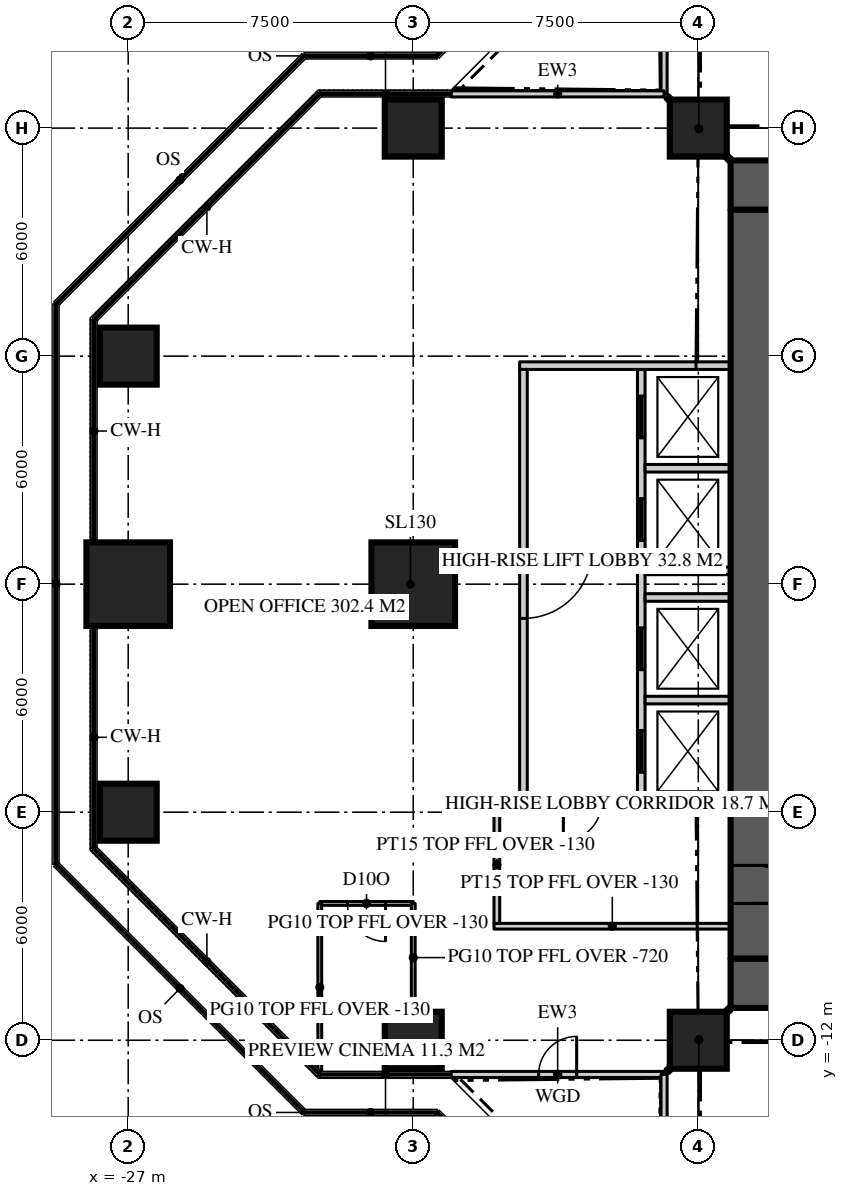
"""IFC4 building model, lengths in metres.
Left out: names, types, materials, properties, quantities, classifications, styles, units other than length and angle.
Written with IfcOpenShell. Run it as: python <this file> out.ifc"""

import sys

from ifc_helpers import new_model, si_unit, direction, frame, frame_2d, origin, origin_2d, place, context, subcontext, project, spatial, rectangle, extrude, element, fill, save


model = new_model("IFC4")
c1 = context("Model", 3, precision=1e-05, world=origin(), true_north=direction((0.0, 1.0)))
c2 = subcontext(c1, "Body", "Model", "MODEL_VIEW")
j1 = project(units=[si_unit("LENGTHUNIT", "METRE"), si_unit("PLANEANGLEUNIT", "RADIAN")], contexts=[c1])
p1 = place(None, origin())
s1 = spatial("IfcSite", under=j1, at=p1, CompositionType="ELEMENT")
p2 = place(p1, origin())
s2 = spatial("IfcBuilding", under=s1, at=p2, CompositionType="ELEMENT")
p3 = place(p2, frame((0.0, 0.0, 255.6)))
s3 = spatial("IfcBuildingStorey", under=s2, at=p3, CompositionType="ELEMENT", Elevation=255.6)
p4 = place(p3, frame((-11.15, 10.5, 0.0), z_axis=(0.0, 0.0, 1.0), x_axis=(1.0, 0.0, 0.0)))
e1 = element("IfcWall", 1, at=p4, inside=s3, PredefinedType="SHEAR", context=c2, shape_type="SweptSolid", body=[
    extrude(rectangle(XDim=22.3, YDim=1.3, at=frame_2d((11.15, 0.0))), origin(), (0.0, 0.0, 1.0), 3.9),
])
p5 = place(p4, frame((4.25, 0.0, 0.0)))
e2 = element("IfcOpeningElement", 2, at=p5, cuts=e1, PredefinedType="OPENING", context=c2, shape_type="SweptSolid", body=[
    extrude(rectangle(XDim=1.8, YDim=2.2, at=frame_2d((0.9, 1.1))), frame((0.0, 0.66, 0.0), z_axis=(0.0, -1.0, 0.0), x_axis=(1.0, 0.0, 0.0)), (0.0, 0.0, 1.0), 1.32),
])
p6 = place(p4, frame((16.25, 0.0, 0.0)))
e3 = element("IfcOpeningElement", 3, at=p6, cuts=e1, PredefinedType="OPENING", context=c2, shape_type="SweptSolid", body=[
    extrude(rectangle(XDim=1.8, YDim=2.2, at=frame_2d((0.9, 1.1))), frame((0.0, 0.66, 0.0), z_axis=(0.0, -1.0, 0.0), x_axis=(1.0, 0.0, 0.0)), (0.0, 0.0, 1.0), 1.32),
])
p7 = place(p3, frame((11.15, -10.5, 0.0), z_axis=(0.0, 0.0, 1.0), x_axis=(-1.0, 0.0, 0.0)))
e4 = element("IfcWall", 4, at=p7, inside=s3, PredefinedType="SHEAR", context=c2, shape_type="SweptSolid", body=[
    extrude(rectangle(XDim=22.3, YDim=1.3, at=frame_2d((11.15, 0.0))), origin(), (0.0, 0.0, 1.0), 3.9),
])
p8 = place(p7, frame((16.25, 0.0, 0.0)))
e5 = element("IfcOpeningElement", 5, at=p8, cuts=e4, PredefinedType="OPENING", context=c2, shape_type="SweptSolid", body=[
    extrude(rectangle(XDim=1.8, YDim=2.2, at=frame_2d((0.9, 1.1))), frame((0.0, 0.66, 0.0), z_axis=(0.0, -1.0, 0.0), x_axis=(1.0, 0.0, 0.0)), (0.0, 0.0, 1.0), 1.32),
])
p9 = place(p7, frame((4.25, 0.0, 0.0)))
e6 = element("IfcOpeningElement", 6, at=p9, cuts=e4, PredefinedType="OPENING", context=c2, shape_type="SweptSolid", body=[
    extrude(rectangle(XDim=1.8, YDim=2.2, at=frame_2d((0.9, 1.1))), frame((0.0, 0.66, 0.0), z_axis=(0.0, -1.0, 0.0), x_axis=(1.0, 0.0, 0.0)), (0.0, 0.0, 1.0), 1.32),
])
p10 = place(p3, frame((-10.5, 9.85, 0.0), z_axis=(0.0, 0.0, 1.0), x_axis=(0.0, -1.0, 0.0)))
e7 = element("IfcWall", 7, at=p10, inside=s3, PredefinedType="SHEAR", context=c2, shape_type="SweptSolid", body=[
    extrude(rectangle(XDim=19.7, YDim=1.3, at=frame_2d((9.85, 0.0))), origin(), (0.0, 0.0, 1.0), 3.9),
])
p11 = place(p10, frame((17.25, 0.0, 0.0)))
e8 = element("IfcOpeningElement", 8, at=p11, cuts=e7, PredefinedType="OPENING", context=c2, shape_type="SweptSolid", body=[
    extrude(rectangle(XDim=1.0, YDim=2.2, at=frame_2d((0.5, 1.1))), frame((0.0, 0.66, 0.0), z_axis=(0.0, -1.0, 0.0), x_axis=(1.0, 0.0, 0.0)), (0.0, 0.0, 1.0), 1.32),
])
for number, where, z_axis, x_axis in (
    (9, (-19.5, -12.0, 0.0), (0.0, 0.0, 1.0), (1.0, 0.0, 0.0)),
    (10, (-12.0, -12.0, 0.0), (0.0, 0.0, 1.0), (1.0, 0.0, 0.0)),
    (11, (-27.0, -6.0, 0.0), (0.0, 0.0, 1.0), (1.0, 0.0, 0.0)),
):
    element("IfcColumn", number, at=place(p3, frame(where, z_axis=z_axis, x_axis=x_axis)), inside=s3, PredefinedType="COLUMN", context=c2, shape_type="SweptSolid", body=[
        extrude(rectangle(XDim=1.5, YDim=1.5, at=origin_2d()), origin(), (0.0, 0.0, 1.0), 3.9),
    ])
for number, where, z_axis, x_axis in (
    (12, (-27.0, 0.0, 0.0), (0.0, 0.0, 1.0), (1.0, 0.0, 0.0)),
    (13, (-19.5, 0.0, 0.0), (0.0, 0.0, 1.0), (1.0, 0.0, 0.0)),
):
    element("IfcColumn", number, at=place(p3, frame(where, z_axis=z_axis, x_axis=x_axis)), inside=s3, PredefinedType="COLUMN", context=c2, shape_type="SweptSolid", body=[
        extrude(rectangle(XDim=2.2, YDim=2.2, at=origin_2d()), origin(), (0.0, 0.0, 1.0), 3.9),
    ])
for number, where, z_axis, x_axis in (
    (14, (-27.0, 6.0, 0.0), (0.0, 0.0, 1.0), (1.0, 0.0, 0.0)),
    (15, (-19.5, 12.0, 0.0), (0.0, 0.0, 1.0), (1.0, 0.0, 0.0)),
    (16, (-12.0, 12.0, 0.0), (0.0, 0.0, 1.0), (1.0, 0.0, 0.0)),
):
    element("IfcColumn", number, at=place(p3, frame(where, z_axis=z_axis, x_axis=x_axis)), inside=s3, PredefinedType="COLUMN", context=c2, shape_type="SweptSolid", body=[
        extrude(rectangle(XDim=1.5, YDim=1.5, at=origin_2d()), origin(), (0.0, 0.0, 1.0), 3.9),
    ])
p12 = place(p3, frame((-12.9, 18.5, 0.0), z_axis=(0.0, 0.0, 1.0), x_axis=(0.0, -1.0, 0.0)))
e17 = element("IfcWall", 17, at=p12, inside=s3, PredefinedType="SOLIDWALL", context=c2, shape_type="SweptSolid", body=[
    extrude(rectangle(XDim=5.6, YDim=0.16, at=frame_2d((2.8, 0.0))), origin(), (0.0, 0.0, 1.0), 3.77),
])
p13 = place(p12, frame((2.3, 0.0, 0.0)))
e18 = element("IfcOpeningElement", 18, at=p13, cuts=e17, PredefinedType="OPENING", context=c2, shape_type="SweptSolid", body=[
    extrude(rectangle(XDim=1.0, YDim=2.2, at=frame_2d((0.5, 1.1))), frame((0.0, 0.09, 0.0), z_axis=(0.0, -1.0, 0.0), x_axis=(1.0, 0.0, 0.0)), (0.0, 0.0, 1.0), 0.18),
])
p14 = place(p3, frame((-12.9, 12.9, 0.0), z_axis=(0.0, 0.0, 1.0), x_axis=(-1.0, 0.0, 0.0)))
e19 = element("IfcWall", 19, at=p14, inside=s3, PredefinedType="SOLIDWALL", context=c2, shape_type="SweptSolid", body=[
    extrude(rectangle(XDim=5.6, YDim=0.16, at=frame_2d((2.8, 0.0))), origin(), (0.0, 0.0, 1.0), 3.77),
])
p15 = place(p3, frame((-18.5, -12.9, 0.0), z_axis=(0.0, 0.0, 1.0), x_axis=(1.0, 0.0, 0.0)))
e20 = element("IfcWall", 20, at=p15, inside=s3, PredefinedType="SOLIDWALL", context=c2, shape_type="SweptSolid", body=[
    extrude(rectangle(XDim=5.6, YDim=0.16, at=frame_2d((2.8, 0.0))), origin(), (0.0, 0.0, 1.0), 3.77),
])
p16 = place(p15, frame((2.3, 0.0, 0.0)))
e21 = element("IfcOpeningElement", 21, at=p16, cuts=e20, PredefinedType="OPENING", context=c2, shape_type="SweptSolid", body=[
    extrude(rectangle(XDim=1.0, YDim=2.2, at=frame_2d((0.5, 1.1))), frame((0.0, 0.09, 0.0), z_axis=(0.0, -1.0, 0.0), x_axis=(1.0, 0.0, 0.0)), (0.0, 0.0, 1.0), 0.18),
])
p17 = place(p3, frame((-12.9, -12.9, 0.0), z_axis=(0.0, 0.0, 1.0), x_axis=(0.0, -1.0, 0.0)))
e22 = element("IfcWall", 22, at=p17, inside=s3, PredefinedType="SOLIDWALL", context=c2, shape_type="SweptSolid", body=[
    extrude(rectangle(XDim=5.6, YDim=0.16, at=frame_2d((2.8, 0.0))), origin(), (0.0, 0.0, 1.0), 3.77),
])
p18 = place(p3, frame((-19.5, -8.4, 0.0), z_axis=(0.0, 0.0, 1.0), x_axis=(-1.0, 0.0, 0.0)))
e23 = element("IfcWall", 23, at=p18, inside=s3, PredefinedType="PARTITIONING", context=c2, shape_type="SweptSolid", body=[
    extrude(rectangle(XDim=2.459, YDim=0.1, at=frame_2d((1.229, 0.0))), origin(), (0.0, 0.0, 1.0), 3.77),
])
p19 = place(p18, frame((0.729, 0.0, 0.0)))
e24 = element("IfcOpeningElement", 24, at=p19, cuts=e23, PredefinedType="OPENING", context=c2, shape_type="SweptSolid", body=[
    extrude(rectangle(XDim=1.0, YDim=2.2, at=frame_2d((0.5, 1.1))), frame((0.0, 0.06, 0.0), z_axis=(0.0, -1.0, 0.0), x_axis=(1.0, 0.0, 0.0)), (0.0, 0.0, 1.0), 0.12),
])
p20 = place(p3, frame((-19.5, -8.4, 0.0), z_axis=(0.0, 0.0, 1.0), x_axis=(0.0, -1.0, 0.0)))
e25 = element("IfcWall", 25, at=p20, inside=s3, PredefinedType="PARTITIONING", context=c2, shape_type="SweptSolid", body=[
    extrude(rectangle(XDim=2.85, YDim=0.1, at=frame_2d((1.425, 0.0))), origin(), (0.0, 0.0, 1.0), 3.18),
])
p21 = place(p3, frame((-21.959, -8.4, 0.0), z_axis=(0.0, 0.0, 1.0), x_axis=(0.0, -1.0, 0.0)))
e26 = element("IfcWall", 26, at=p21, inside=s3, PredefinedType="PARTITIONING", context=c2, shape_type="SweptSolid", body=[
    extrude(rectangle(XDim=4.42, YDim=0.1, at=frame_2d((2.21, 0.0))), origin(), (0.0, 0.0, 1.0), 3.77),
])
p22 = place(p3, frame((-13.5, 5.65, 0.0), z_axis=(0.0, 0.0, 1.0), x_axis=(0.0, -1.0, 0.0)))
e27 = element("IfcWall", 27, at=p22, inside=s3, PredefinedType="SOLIDWALL", context=c2, shape_type="SweptSolid", body=[
    extrude(rectangle(XDim=11.3, YDim=0.2, at=frame_2d((5.65, 0.0))), origin(), (0.0, 0.0, 1.0), 3.7),
])
p23 = place(p22, frame((0.7, 0.0, 0.0)))
e28 = element("IfcOpeningElement", 28, at=p23, cuts=e27, PredefinedType="OPENING", context=c2, shape_type="SweptSolid", body=[
    extrude(rectangle(XDim=1.1, YDim=2.2, at=frame_2d((0.55, 1.1))), frame((0.0, 0.11, 0.0), z_axis=(0.0, -1.0, 0.0), x_axis=(1.0, 0.0, 0.0)), (0.0, 0.0, 1.0), 0.22),
])
p24 = place(p22, frame((3.4, 0.0, 0.0)))
e29 = element("IfcOpeningElement", 29, at=p24, cuts=e27, PredefinedType="OPENING", context=c2, shape_type="SweptSolid", body=[
    extrude(rectangle(XDim=1.1, YDim=2.2, at=frame_2d((0.55, 1.1))), frame((0.0, 0.11, 0.0), z_axis=(0.0, -1.0, 0.0), x_axis=(1.0, 0.0, 0.0)), (0.0, 0.0, 1.0), 0.22),
])
p25 = place(p22, frame((6.8, 0.0, 0.0)))
e30 = element("IfcOpeningElement", 30, at=p25, cuts=e27, PredefinedType="OPENING", context=c2, shape_type="SweptSolid", body=[
    extrude(rectangle(XDim=1.1, YDim=2.2, at=frame_2d((0.55, 1.1))), frame((0.0, 0.11, 0.0), z_axis=(0.0, -1.0, 0.0), x_axis=(1.0, 0.0, 0.0)), (0.0, 0.0, 1.0), 0.22),
])
p26 = place(p22, frame((9.5, 0.0, 0.0)))
e31 = element("IfcOpeningElement", 31, at=p26, cuts=e27, PredefinedType="OPENING", context=c2, shape_type="SweptSolid", body=[
    extrude(rectangle(XDim=1.1, YDim=2.2, at=frame_2d((0.55, 1.1))), frame((0.0, 0.11, 0.0), z_axis=(0.0, -1.0, 0.0), x_axis=(1.0, 0.0, 0.0)), (0.0, 0.0, 1.0), 0.22),
])
p27 = place(p3, frame((-11.15, 5.75, 0.0), z_axis=(0.0, 0.0, 1.0), x_axis=(-1.0, 0.0, 0.0)))
e32 = element("IfcWall", 32, at=p27, inside=s3, PredefinedType="SOLIDWALL", context=c2, shape_type="SweptSolid", body=[
    extrude(rectangle(XDim=5.55, YDim=0.2, at=frame_2d((2.775, 0.0))), origin(), (0.0, 0.0, 1.0), 3.7),
])
p28 = place(p3, frame((-11.15, -5.75, 0.0), z_axis=(0.0, 0.0, 1.0), x_axis=(-1.0, 0.0, 0.0)))
e33 = element("IfcWall", 33, at=p28, inside=s3, PredefinedType="SOLIDWALL", context=c2, shape_type="SweptSolid", body=[
    extrude(rectangle(XDim=5.55, YDim=0.2, at=frame_2d((2.775, 0.0))), origin(), (0.0, 0.0, 1.0), 3.7),
])
p29 = place(p28, frame((3.4, 0.0, 0.0)))
e34 = element("IfcOpeningElement", 34, at=p29, cuts=e33, PredefinedType="OPENING", context=c2, shape_type="SweptSolid", body=[
    extrude(rectangle(XDim=1.0, YDim=2.2, at=frame_2d((0.5, 1.1))), frame((0.0, 0.11, 0.0), z_axis=(0.0, -1.0, 0.0), x_axis=(1.0, 0.0, 0.0)), (0.0, 0.0, 1.0), 0.22),
])
for number, where, z_axis, x_axis in (
    (35, (-11.15, 3.05, 0.0), (0.0, 0.0, 1.0), (-1.0, 0.0, 0.0)),
    (36, (-11.15, 0.35, 0.0), (0.0, 0.0, 1.0), (-1.0, 0.0, 0.0)),
    (37, (-11.15, -0.35, 0.0), (0.0, 0.0, 1.0), (-1.0, 0.0, 0.0)),
    (38, (-11.15, -3.05, 0.0), (0.0, 0.0, 1.0), (-1.0, 0.0, 0.0)),
):
    element("IfcWall", number, at=place(p3, frame(where, z_axis=z_axis, x_axis=x_axis)), inside=s3, PredefinedType="SOLIDWALL", context=c2, shape_type="SweptSolid", body=[
        extrude(rectangle(XDim=2.25, YDim=0.2, at=frame_2d((1.125, 0.0))), origin(), (0.0, 0.0, 1.0), 3.7),
    ])
p30 = place(p3, frame((-16.6, 5.65, 0.0), z_axis=(0.0, 0.0, 1.0), x_axis=(0.0, -1.0, 0.0)))
e39 = element("IfcWall", 39, at=p30, inside=s3, PredefinedType="SOLIDWALL", context=c2, shape_type="SweptSolid", body=[
    extrude(rectangle(XDim=11.3, YDim=0.2, at=frame_2d((5.65, 0.0))), origin(), (0.0, 0.0, 1.0), 3.18),
])
p31 = place(p30, frame((4.75, 0.0, 0.0)))
e40 = element("IfcOpeningElement", 40, at=p31, cuts=e39, PredefinedType="OPENING", context=c2, shape_type="SweptSolid", body=[
    extrude(rectangle(XDim=1.8, YDim=2.2, at=frame_2d((0.9, 1.1))), frame((0.0, 0.11, 0.0), z_axis=(0.0, -1.0, 0.0), x_axis=(1.0, 0.0, 0.0)), (0.0, 0.0, 1.0), 0.22),
])
for number, where, z_axis, x_axis in (
    (41, (-11.15, 11.15, 0.0), (0.0, 0.0, 1.0), (-0.707, 0.707, 0.0)),
    (42, (-11.15, -11.15, 0.0), (0.0, 0.0, 1.0), (-0.707, -0.707, 0.0)),
):
    element("IfcWall", number, at=place(p3, frame(where, z_axis=z_axis, x_axis=x_axis)), inside=s3, PredefinedType="PARTITIONING", context=c2, shape_type="SweptSolid", body=[
        extrude(rectangle(XDim=2.362, YDim=0.15, at=frame_2d((1.181, 0.0))), origin(), (0.0, 0.0, 1.0), 3.22),
    ])
p32 = place(p3, frame((-11.15, -9.0, 0.0), z_axis=(0.0, 0.0, 1.0), x_axis=(-1.0, 0.0, 0.0)))
e43 = element("IfcWall", 43, at=p32, inside=s3, PredefinedType="PARTITIONING", context=c2, shape_type="SweptSolid", body=[
    extrude(rectangle(XDim=6.225, YDim=0.15, at=frame_2d((3.113, 0.0))), origin(), (0.0, 0.0, 1.0), 3.77),
])
p33 = place(p3, frame((-17.3, -5.85, 0.0), z_axis=(0.0, 0.0, 1.0), x_axis=(0.0, -1.0, 0.0)))
e44 = element("IfcWall", 44, at=p33, inside=s3, PredefinedType="PARTITIONING", context=c2, shape_type="SweptSolid", body=[
    extrude(rectangle(XDim=3.075, YDim=0.15, at=frame_2d((1.538, 0.0))), origin(), (0.0, 0.0, 1.0), 3.77),
])
p34 = place(p16, origin())
e45 = element("IfcDoor", 45, at=p34, inside=s3, OperationType="SINGLE_SWING_RIGHT", PredefinedType="DOOR", context=c2, shape_type="SweptSolid", body=[
    extrude(rectangle(XDim=1.0, YDim=2.2, at=frame_2d((0.5, 1.1))), frame((0.0, 0.025, 0.0), z_axis=(0.0, -1.0, 0.0), x_axis=(1.0, 0.0, 0.0)), (0.0, 0.0, 1.0), 0.05),
])
fill(e21, e45)
p35 = place(p11, origin())
e46 = element("IfcDoor", 46, at=p35, inside=s3, OperationType="SINGLE_SWING_RIGHT", PredefinedType="DOOR", context=c2, shape_type="SweptSolid", body=[
    extrude(rectangle(XDim=1.0, YDim=2.2, at=frame_2d((0.5, 1.1))), frame((0.0, 0.025, 0.0), z_axis=(0.0, -1.0, 0.0), x_axis=(1.0, 0.0, 0.0)), (0.0, 0.0, 1.0), 0.05),
])
fill(e8, e46)
p36 = place(p19, origin())
e47 = element("IfcDoor", 47, at=p36, inside=s3, OperationType="SINGLE_SWING_LEFT", PredefinedType="DOOR", context=c2, shape_type="SweptSolid", body=[
    extrude(rectangle(XDim=1.0, YDim=2.2, at=frame_2d((0.5, 1.1))), frame((0.0, 0.025, 0.0), z_axis=(0.0, -1.0, 0.0), x_axis=(1.0, 0.0, 0.0)), (0.0, 0.0, 1.0), 0.05),
])
fill(e24, e47)
p37 = place(p31, origin())
e48 = element("IfcDoor", 48, at=p37, inside=s3, OperationType="DOUBLE_DOOR_DOUBLE_SWING", PredefinedType="DOOR", context=c2, shape_type="SweptSolid", body=[
    extrude(rectangle(XDim=1.8, YDim=2.2, at=frame_2d((0.9, 1.1))), frame((0.0, 0.025, 0.0), z_axis=(0.0, -1.0, 0.0), x_axis=(1.0, 0.0, 0.0)), (0.0, 0.0, 1.0), 0.05),
])
fill(e40, e48)
p38 = place(p23, origin())
e49 = element("IfcDoor", 49, at=p38, inside=s3, OperationType="SLIDING_TO_LEFT", PredefinedType="DOOR", context=c2, shape_type="SweptSolid", body=[
    extrude(rectangle(XDim=1.1, YDim=2.2, at=frame_2d((0.55, 1.1))), frame((0.0, 0.025, 0.0), z_axis=(0.0, -1.0, 0.0), x_axis=(1.0, 0.0, 0.0)), (0.0, 0.0, 1.0), 0.05),
])
fill(e28, e49)
p39 = place(p24, origin())
e50 = element("IfcDoor", 50, at=p39, inside=s3, OperationType="SLIDING_TO_LEFT", PredefinedType="DOOR", context=c2, shape_type="SweptSolid", body=[
    extrude(rectangle(XDim=1.1, YDim=2.2, at=frame_2d((0.55, 1.1))), frame((0.0, 0.025, 0.0), z_axis=(0.0, -1.0, 0.0), x_axis=(1.0, 0.0, 0.0)), (0.0, 0.0, 1.0), 0.05),
])
fill(e29, e50)
p40 = place(p25, origin())
e51 = element("IfcDoor", 51, at=p40, inside=s3, OperationType="SLIDING_TO_LEFT", PredefinedType="DOOR", context=c2, shape_type="SweptSolid", body=[
    extrude(rectangle(XDim=1.1, YDim=2.2, at=frame_2d((0.55, 1.1))), frame((0.0, 0.025, 0.0), z_axis=(0.0, -1.0, 0.0), x_axis=(1.0, 0.0, 0.0)), (0.0, 0.0, 1.0), 0.05),
])
fill(e30, e51)
p41 = place(p26, origin())
e52 = element("IfcDoor", 52, at=p41, inside=s3, OperationType="SLIDING_TO_LEFT", PredefinedType="DOOR", context=c2, shape_type="SweptSolid", body=[
    extrude(rectangle(XDim=1.1, YDim=2.2, at=frame_2d((0.55, 1.1))), frame((0.0, 0.025, 0.0), z_axis=(0.0, -1.0, 0.0), x_axis=(1.0, 0.0, 0.0)), (0.0, 0.0, 1.0), 0.05),
])
fill(e31, e52)
p42 = place(p29, origin())
e53 = element("IfcDoor", 53, at=p42, inside=s3, OperationType="SINGLE_SWING_RIGHT", PredefinedType="DOOR", context=c2, shape_type="SweptSolid", body=[
    extrude(rectangle(XDim=1.0, YDim=2.2, at=frame_2d((0.5, 1.1))), frame((0.0, 0.025, 0.0), z_axis=(0.0, -1.0, 0.0), x_axis=(1.0, 0.0, 0.0)), (0.0, 0.0, 1.0), 0.05),
])
fill(e34, e53)
save(model, sys.argv[1])
